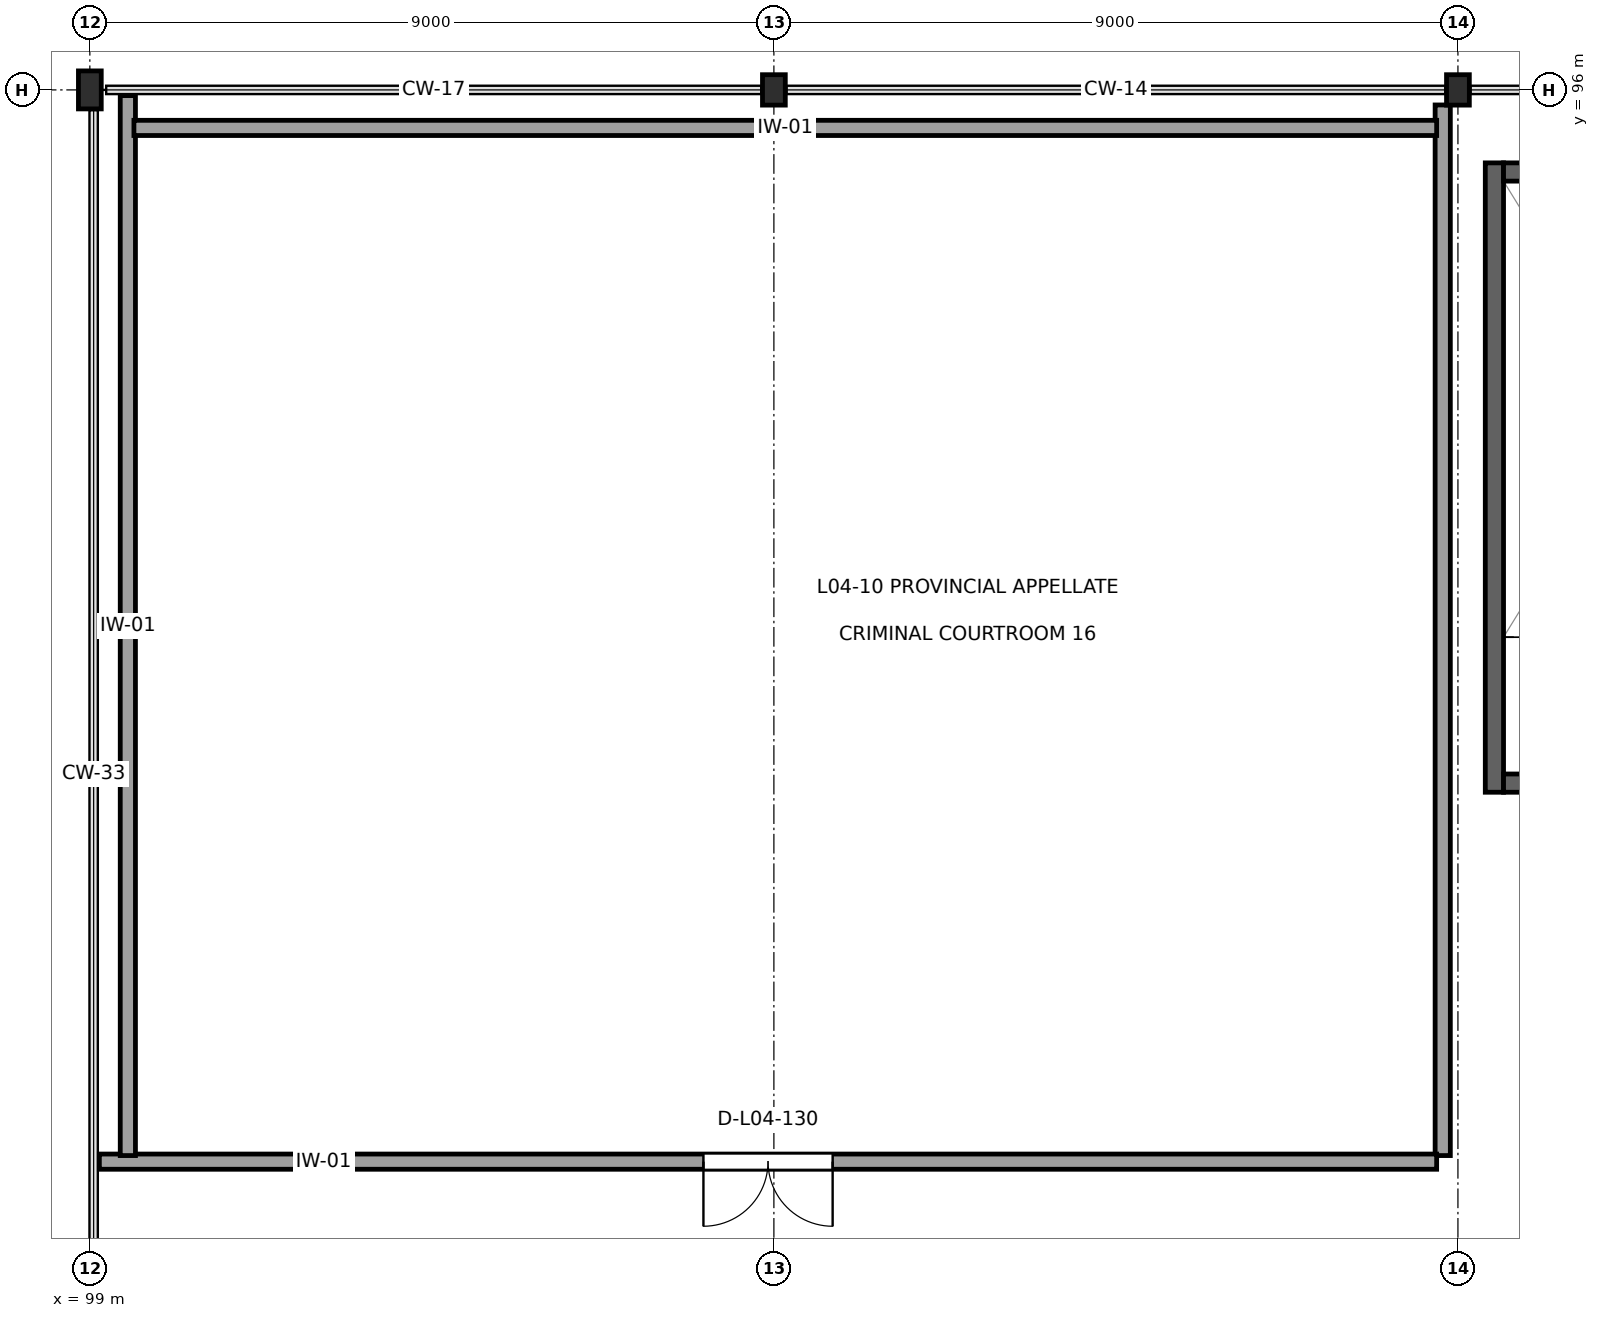
"""IFC4 building model, lengths in metres.
Left out: names, types, materials, properties, quantities, classifications, styles, units other than length and angle.
Written with IfcOpenShell. Run it as: python <this file> out.ifc"""

import sys

from ifc_helpers import new_model, si_unit, direction, frame, frame_2d, origin, origin_2d, place, context, subcontext, project, spatial, rectangle, i_section, extrude, element, fill, save


model = new_model("IFC4")
c1 = context("Model", 3, precision=1e-05, world=origin(), true_north=direction((0.0, 1.0)))
c2 = subcontext(c1, "Body", "Model", "MODEL_VIEW")
j1 = project(units=[si_unit("LENGTHUNIT", "METRE"), si_unit("PLANEANGLEUNIT", "RADIAN")], contexts=[c1])
p1 = place(None, origin())
s1 = spatial("IfcSite", under=j1, at=p1, CompositionType="ELEMENT")
p2 = place(p1, origin())
s2 = spatial("IfcBuilding", under=s1, at=p2, CompositionType="ELEMENT")
p3 = place(p2, frame((0.0, 0.0, 18.9)))
s3 = spatial("IfcBuildingStorey", under=s2, at=p3, CompositionType="ELEMENT", Elevation=18.9)
p4 = place(p3, frame((99.0, 96.0, 0.0), z_axis=(0.0, 0.0, 1.0), x_axis=(1.0, 0.0, 0.0)))
e1 = element("IfcColumn", 1, at=p4, inside=s3, PredefinedType="COLUMN", context=c2, shape_type="SweptSolid", body=[
    extrude(i_section(OverallWidth=0.3, OverallDepth=0.5, WebThickness=0.014, FlangeThickness=0.028, at=origin_2d()), origin(), (0.0, 0.0, 1.0), 4.5),
])
for number, where, z_axis, x_axis in (
    (2, (108.0, 96.0, 0.0), (0.0, 0.0, 1.0), (1.0, 0.0, 0.0)),
    (3, (117.0, 96.0, 0.0), (0.0, 0.0, 1.0), (1.0, 0.0, 0.0)),
):
    element("IfcColumn", number, at=place(p3, frame(where, z_axis=z_axis, x_axis=x_axis)), inside=s3, PredefinedType="COLUMN", context=c2, shape_type="SweptSolid", body=[
        extrude(i_section(OverallWidth=0.3, OverallDepth=0.4, WebThickness=0.013, FlangeThickness=0.024, at=origin_2d()), origin(), (0.0, 0.0, 1.0), 4.5),
    ])
p5 = place(p3, frame((117.48, 86.76, 0.0), z_axis=(0.0, 0.0, 1.0), x_axis=(0.0, 1.0, 0.0)))
e4 = element("IfcWall", 4, at=p5, inside=s3, PredefinedType="SHEAR", context=c2, shape_type="SweptSolid", body=[
    extrude(rectangle(XDim=8.28, YDim=0.24, at=frame_2d((4.14, 0.0))), origin(), (0.0, 0.0, 1.0), 4.31),
])
for number, where, z_axis, x_axis in (
    (5, (117.6, 86.88, 0.0), (0.0, 0.0, 1.0), (1.0, 0.0, 0.0)),
    (6, (117.6, 94.92, 0.0), (0.0, 0.0, 1.0), (1.0, 0.0, 0.0)),
):
    element("IfcWall", number, at=place(p3, frame(where, z_axis=z_axis, x_axis=x_axis)), inside=s3, PredefinedType="SHEAR", context=c2, shape_type="SweptSolid", body=[
        extrude(rectangle(XDim=3.7, YDim=0.24, at=frame_2d((1.85, 0.0))), origin(), (0.0, 0.0, 1.0), 4.31),
    ])
p6 = place(p3, frame((116.8, 95.802, 0.0), z_axis=(0.0, 0.0, 1.0), x_axis=(0.0, -1.0, 0.0)))
e7 = element("IfcWall", 7, at=p6, inside=s3, PredefinedType="PARTITIONING", context=c2, shape_type="SweptSolid", body=[
    extrude(rectangle(XDim=13.822, YDim=0.2, at=frame_2d((6.911, 0.0))), origin(), (0.0, 0.0, 1.0), 4.14),
])
p7 = place(p3, frame((116.72, 81.9, 0.0), z_axis=(0.0, 0.0, 1.0), x_axis=(-1.0, 0.0, 0.0)))
e8 = element("IfcWall", 8, at=p7, inside=s3, PredefinedType="PARTITIONING", context=c2, shape_type="SweptSolid", body=[
    extrude(rectangle(XDim=17.595, YDim=0.2, at=frame_2d((8.797, 0.0))), origin(), (0.0, 0.0, 1.0), 4.14),
])
p8 = place(p7, frame((7.947, 0.0, 0.0)))
e9 = element("IfcOpeningElement", 9, at=p8, cuts=e8, PredefinedType="OPENING", context=c2, shape_type="SweptSolid", body=[
    extrude(rectangle(XDim=1.7, YDim=2.4, at=frame_2d((0.85, 1.2))), frame((0.0, 0.115, 0.0), z_axis=(0.0, -1.0, 0.0), x_axis=(1.0, 0.0, 0.0)), (0.0, 0.0, 1.0), 0.23),
])
p9 = place(p3, frame((99.5, 81.98, 0.0), z_axis=(0.0, 0.0, 1.0), x_axis=(0.0, 1.0, 0.0)))
e10 = element("IfcWall", 10, at=p9, inside=s3, PredefinedType="PARTITIONING", context=c2, shape_type="SweptSolid", body=[
    extrude(rectangle(XDim=13.945, YDim=0.2, at=frame_2d((6.973, 0.0))), origin(), (0.0, 0.0, 1.0), 4.14),
])
p10 = place(p3, frame((99.58, 95.5, 0.0), z_axis=(0.0, 0.0, 1.0), x_axis=(1.0, 0.0, 0.0)))
e11 = element("IfcWall", 11, at=p10, inside=s3, PredefinedType="PARTITIONING", context=c2, shape_type="SweptSolid", body=[
    extrude(rectangle(XDim=17.14, YDim=0.2, at=frame_2d((8.57, 0.0))), origin(), (0.0, 0.0, 1.0), 4.14),
])
p11 = place(p8, origin())
e12 = element("IfcDoor", 12, at=p11, inside=s3, OperationType="DOUBLE_DOOR_SINGLE_SWING", PredefinedType="DOOR", context=c2, shape_type="SweptSolid", body=[
    extrude(rectangle(XDim=1.7, YDim=2.4, at=frame_2d((0.85, 1.2))), frame((0.0, 0.025, 0.0), z_axis=(0.0, -1.0, 0.0), x_axis=(1.0, 0.0, 0.0)), (0.0, 0.0, 1.0), 0.05),
])
fill(e9, e12)
save(model, sys.argv[1])
